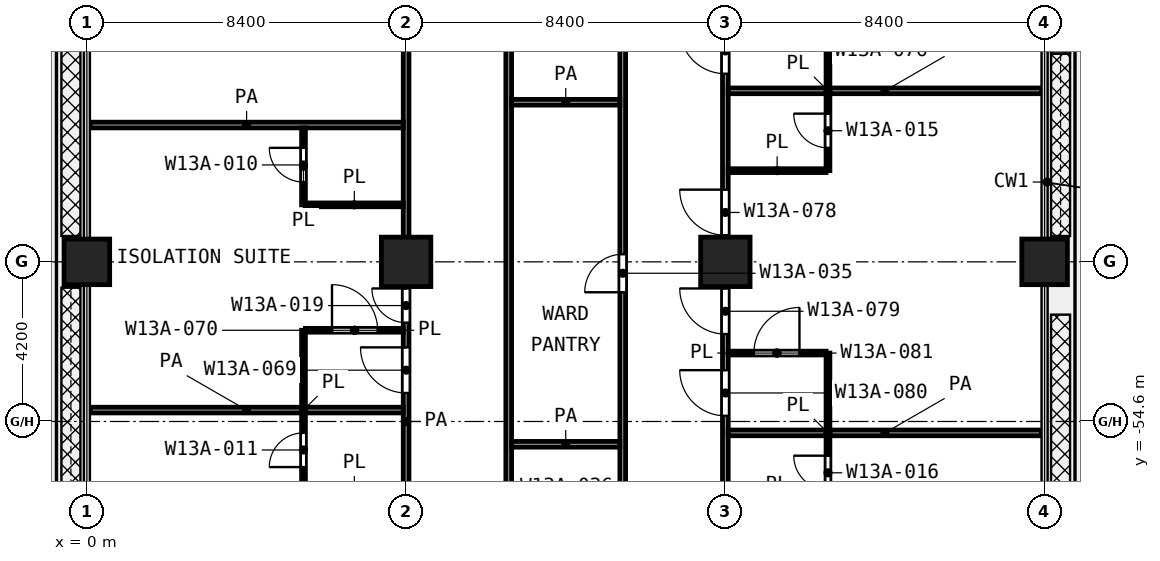
"""IFC4 building model, lengths in metres.
Left out: names, types, materials, properties, quantities, classifications, styles, units other than length and angle.
Written with IfcOpenShell. Run it as: python <this file> out.ifc"""

import sys

from ifc_helpers import new_model, si_unit, direction, frame, frame_2d, origin, origin_2d, place, context, subcontext, project, spatial, rectangle, extrude, element, fill, save


model = new_model("IFC4")
c1 = context("Model", 3, precision=1e-05, world=origin(), true_north=direction((0.0, 1.0)))
c2 = subcontext(c1, "Body", "Model", "MODEL_VIEW")
j1 = project(units=[si_unit("LENGTHUNIT", "METRE"), si_unit("PLANEANGLEUNIT", "RADIAN")], contexts=[c1])
p1 = place(None, origin())
s1 = spatial("IfcSite", under=j1, at=p1, CompositionType="ELEMENT")
p2 = place(p1, origin())
s2 = spatial("IfcBuilding", under=s1, at=p2, CompositionType="ELEMENT")
p3 = place(p2, frame((0.0, 0.0, 60.2)))
s3 = spatial("IfcBuildingStorey", under=s2, at=p3, CompositionType="ELEMENT", Elevation=60.2)
p4 = place(p3, frame((0.0, -50.4, 0.0), z_axis=(0.0, 0.0, 1.0), x_axis=(1.0, 0.0, 0.0)))
e1 = element("IfcColumn", 1, at=p4, inside=s3, PredefinedType="COLUMN", context=c2, shape_type="SweptSolid", body=[
    extrude(rectangle(XDim=1.2, YDim=1.2, at=origin_2d()), origin(), (0.0, 0.0, 1.0), 4.2),
])
for number, where, z_axis, x_axis in (
    (2, (8.4, -50.4, 0.0), (0.0, 0.0, 1.0), (1.0, 0.0, 0.0)),
    (3, (16.8, -50.4, 0.0), (0.0, 0.0, 1.0), (1.0, 0.0, 0.0)),
):
    element("IfcColumn", number, at=place(p3, frame(where, z_axis=z_axis, x_axis=x_axis)), inside=s3, PredefinedType="COLUMN", context=c2, shape_type="SweptSolid", body=[
        extrude(rectangle(XDim=1.3, YDim=1.3, at=origin_2d()), origin(), (0.0, 0.0, 1.0), 4.2),
    ])
p5 = place(p3, frame((25.2, -50.4, 0.0), z_axis=(0.0, 0.0, 1.0), x_axis=(1.0, 0.0, 0.0)))
e4 = element("IfcColumn", 4, at=p5, inside=s3, PredefinedType="COLUMN", context=c2, shape_type="SweptSolid", body=[
    extrude(rectangle(XDim=1.2, YDim=1.2, at=origin_2d()), origin(), (0.0, 0.0, 1.0), 4.2),
])
p6 = place(p3, frame((16.875, -52.8, 0.0), z_axis=(0.0, 0.0, 1.0), x_axis=(1.0, 0.0, 0.0)))
e5 = element("IfcWall", 5, at=p6, inside=s3, PredefinedType="PARTITIONING", context=c2, shape_type="SweptSolid", body=[
    extrude(rectangle(XDim=2.575, YDim=0.1, at=frame_2d((1.288, 0.0))), origin(), (0.0, 0.0, 1.0), 3.9),
])
p7 = place(p6, frame((0.675, 0.0, 0.0)))
e6 = element("IfcOpeningElement", 6, at=p7, cuts=e5, PredefinedType="OPENING", context=c2, shape_type="SweptSolid", body=[
    extrude(rectangle(XDim=1.2, YDim=2.1, at=frame_2d((0.6, 1.05))), frame((0.0, 0.06, 0.0), z_axis=(0.0, -1.0, 0.0), x_axis=(1.0, 0.0, 0.0)), (0.0, 0.0, 1.0), 0.12),
])
p8 = place(p3, frame((5.75, -52.2, 0.0), z_axis=(0.0, 0.0, 1.0), x_axis=(1.0, 0.0, 0.0)))
e7 = element("IfcWall", 7, at=p8, inside=s3, PredefinedType="PARTITIONING", context=c2, shape_type="SweptSolid", body=[
    extrude(rectangle(XDim=2.575, YDim=0.1, at=frame_2d((1.288, 0.0))), origin(), (0.0, 0.0, 1.0), 3.9),
])
p9 = place(p8, frame((0.7, 0.0, 0.0)))
e8 = element("IfcOpeningElement", 8, at=p9, cuts=e7, PredefinedType="OPENING", context=c2, shape_type="SweptSolid", body=[
    extrude(rectangle(XDim=1.2, YDim=2.1, at=frame_2d((0.6, 1.05))), frame((0.0, 0.06, 0.0), z_axis=(0.0, -1.0, 0.0), x_axis=(1.0, 0.0, 0.0)), (0.0, 0.0, 1.0), 0.12),
])
for number, where, z_axis, x_axis in (
    (9, (5.75, -48.9, 0.0), (0.0, 0.0, 1.0), (1.0, 0.0, 0.0)),
    (10, (16.875, -48.0, 0.0), (0.0, 0.0, 1.0), (1.0, 0.0, 0.0)),
):
    element("IfcWall", number, at=place(p3, frame(where, z_axis=z_axis, x_axis=x_axis)), inside=s3, PredefinedType="PARTITIONING", context=c2, shape_type="SweptSolid", body=[
        extrude(rectangle(XDim=2.575, YDim=0.1, at=frame_2d((1.288, 0.0))), origin(), (0.0, 0.0, 1.0), 3.9),
    ])
p10 = place(p3, frame((5.7, -56.4, 0.0), z_axis=(0.0, 0.0, 1.0), x_axis=(0.0, 1.0, 0.0)))
e11 = element("IfcWall", 11, at=p10, inside=s3, PredefinedType="PARTITIONING", context=c2, shape_type="SweptSolid", body=[
    extrude(rectangle(XDim=4.2, YDim=0.1, at=frame_2d((2.1, 0.0))), origin(), (0.0, 0.0, 1.0), 3.9),
])
p11 = place(p10, frame((0.6, 0.0, 0.0)))
e12 = element("IfcOpeningElement", 12, at=p11, cuts=e11, PredefinedType="OPENING", context=c2, shape_type="SweptSolid", body=[
    extrude(rectangle(XDim=0.9, YDim=2.1, at=frame_2d((0.45, 1.05))), frame((0.0, 0.06, 0.0), z_axis=(0.0, -1.0, 0.0), x_axis=(1.0, 0.0, 0.0)), (0.0, 0.0, 1.0), 0.12),
])
p12 = place(p3, frame((5.7, -48.9, 0.0), z_axis=(0.0, 0.0, 1.0), x_axis=(0.0, 1.0, 0.0)))
e13 = element("IfcWall", 13, at=p12, inside=s3, PredefinedType="PARTITIONING", context=c2, shape_type="SweptSolid", body=[
    extrude(rectangle(XDim=2.025, YDim=0.1, at=frame_2d((1.012, 0.0))), origin(), (0.0, 0.0, 1.0), 3.9),
])
p13 = place(p12, frame((0.6, 0.0, 0.0)))
e14 = element("IfcOpeningElement", 14, at=p13, cuts=e13, PredefinedType="OPENING", context=c2, shape_type="SweptSolid", body=[
    extrude(rectangle(XDim=0.9, YDim=2.1, at=frame_2d((0.45, 1.05))), frame((0.0, 0.06, 0.0), z_axis=(0.0, -1.0, 0.0), x_axis=(1.0, 0.0, 0.0)), (0.0, 0.0, 1.0), 0.12),
])
p14 = place(p3, frame((19.5, -57.0, 0.0), z_axis=(0.0, 0.0, 1.0), x_axis=(0.0, 1.0, 0.0)))
e15 = element("IfcWall", 15, at=p14, inside=s3, PredefinedType="PARTITIONING", context=c2, shape_type="SweptSolid", body=[
    extrude(rectangle(XDim=4.2, YDim=0.1, at=frame_2d((2.1, 0.0))), origin(), (0.0, 0.0, 1.0), 3.9),
])
p15 = place(p14, frame((0.6, 0.0, 0.0)))
e16 = element("IfcOpeningElement", 16, at=p15, cuts=e15, PredefinedType="OPENING", context=c2, shape_type="SweptSolid", body=[
    extrude(rectangle(XDim=0.9, YDim=2.1, at=frame_2d((0.45, 1.05))), frame((0.0, 0.06, 0.0), z_axis=(0.0, -1.0, 0.0), x_axis=(1.0, 0.0, 0.0)), (0.0, 0.0, 1.0), 0.12),
])
p16 = place(p3, frame((19.5, -48.0, 0.0), z_axis=(0.0, 0.0, 1.0), x_axis=(0.0, 1.0, 0.0)))
e17 = element("IfcWall", 17, at=p16, inside=s3, PredefinedType="PARTITIONING", context=c2, shape_type="SweptSolid", body=[
    extrude(rectangle(XDim=4.2, YDim=0.1, at=frame_2d((2.1, 0.0))), origin(), (0.0, 0.0, 1.0), 3.9),
])
p17 = place(p16, frame((0.6, 0.0, 0.0)))
e18 = element("IfcOpeningElement", 18, at=p17, cuts=e17, PredefinedType="OPENING", context=c2, shape_type="SweptSolid", body=[
    extrude(rectangle(XDim=0.9, YDim=2.1, at=frame_2d((0.45, 1.05))), frame((0.0, 0.06, 0.0), z_axis=(0.0, -1.0, 0.0), x_axis=(1.0, 0.0, 0.0)), (0.0, 0.0, 1.0), 0.12),
])
p18 = place(p3, frame((11.175, -55.2, 0.0), z_axis=(0.0, 0.0, 1.0), x_axis=(1.0, 0.0, 0.0)))
e19 = element("IfcWall", 19, at=p18, inside=s3, PredefinedType="PARTITIONING", context=c2, shape_type="SweptSolid", body=[
    extrude(rectangle(XDim=2.85, YDim=0.15, at=frame_2d((1.425, 0.0))), origin(), (0.0, 0.0, 1.0), 3.9),
])
p19 = place(p3, frame((16.875, -54.9, 0.0), z_axis=(0.0, 0.0, 1.0), x_axis=(1.0, 0.0, 0.0)))
e20 = element("IfcWall", 20, at=p19, inside=s3, PredefinedType="PARTITIONING", context=c2, shape_type="SweptSolid", body=[
    extrude(rectangle(XDim=8.245, YDim=0.15, at=frame_2d((4.123, 0.0))), origin(), (0.0, 0.0, 1.0), 3.9),
])
for number, where, z_axis, x_axis in (
    (21, (0.08, -54.3, 0.0), (0.0, 0.0, 1.0), (1.0, 0.0, 0.0)),
    (22, (0.08, -46.8, 0.0), (0.0, 0.0, 1.0), (1.0, 0.0, 0.0)),
):
    element("IfcWall", number, at=place(p3, frame(where, z_axis=z_axis, x_axis=x_axis)), inside=s3, PredefinedType="PARTITIONING", context=c2, shape_type="SweptSolid", body=[
        extrude(rectangle(XDim=8.245, YDim=0.15, at=frame_2d((4.123, 0.0))), origin(), (0.0, 0.0, 1.0), 3.9),
    ])
p20 = place(p3, frame((11.175, -46.2, 0.0), z_axis=(0.0, 0.0, 1.0), x_axis=(1.0, 0.0, 0.0)))
e23 = element("IfcWall", 23, at=p20, inside=s3, PredefinedType="PARTITIONING", context=c2, shape_type="SweptSolid", body=[
    extrude(rectangle(XDim=2.85, YDim=0.15, at=frame_2d((1.425, 0.0))), origin(), (0.0, 0.0, 1.0), 3.9),
])
p21 = place(p3, frame((16.875, -45.9, 0.0), z_axis=(0.0, 0.0, 1.0), x_axis=(1.0, 0.0, 0.0)))
e24 = element("IfcWall", 24, at=p21, inside=s3, PredefinedType="PARTITIONING", context=c2, shape_type="SweptSolid", body=[
    extrude(rectangle(XDim=8.245, YDim=0.15, at=frame_2d((4.123, 0.0))), origin(), (0.0, 0.0, 1.0), 3.9),
])
p22 = place(p3, frame((8.4, -66.55, 0.0), z_axis=(0.0, 0.0, 1.0), x_axis=(0.0, 1.0, 0.0)))
e25 = element("IfcWall", 25, at=p22, inside=s3, PredefinedType="PARTITIONING", context=c2, shape_type="SweptSolid", body=[
    extrude(rectangle(XDim=23.9, YDim=0.15, at=frame_2d((11.95, 0.0))), origin(), (0.0, 0.0, 1.0), 3.9),
])
p23 = place(p22, frame((14.55, 0.0, 0.0)))
e26 = element("IfcOpeningElement", 26, at=p23, cuts=e25, PredefinedType="OPENING", context=c2, shape_type="SweptSolid", body=[
    extrude(rectangle(XDim=0.9, YDim=2.1, at=frame_2d((0.45, 1.05))), frame((0.0, 0.085, 0.0), z_axis=(0.0, -1.0, 0.0), x_axis=(1.0, 0.0, 0.0)), (0.0, 0.0, 1.0), 0.17),
])
p24 = place(p22, frame((12.7, 0.0, 0.0)))
e27 = element("IfcOpeningElement", 27, at=p24, cuts=e25, PredefinedType="OPENING", context=c2, shape_type="SweptSolid", body=[
    extrude(rectangle(XDim=1.2, YDim=2.1, at=frame_2d((0.6, 1.05))), frame((0.0, 0.085, 0.0), z_axis=(0.0, -1.0, 0.0), x_axis=(1.0, 0.0, 0.0)), (0.0, 0.0, 1.0), 0.17),
])
p25 = place(p22, frame((5.85, 0.0, 0.0)))
e28 = element("IfcOpeningElement", 28, at=p25, cuts=e25, PredefinedType="OPENING", context=c2, shape_type="SweptSolid", body=[
    extrude(rectangle(XDim=1.2, YDim=2.1, at=frame_2d((0.6, 1.05))), frame((0.0, 0.085, 0.0), z_axis=(0.0, -1.0, 0.0), x_axis=(1.0, 0.0, 0.0)), (0.0, 0.0, 1.0), 0.17),
])
p26 = place(p22, frame((8.45, 0.0, 0.0)))
e29 = element("IfcOpeningElement", 29, at=p26, cuts=e25, PredefinedType="OPENING", context=c2, shape_type="SweptSolid", body=[
    extrude(rectangle(XDim=1.2, YDim=2.1, at=frame_2d((0.6, 1.05))), frame((0.0, 0.085, 0.0), z_axis=(0.0, -1.0, 0.0), x_axis=(1.0, 0.0, 0.0)), (0.0, 0.0, 1.0), 0.17),
])
p27 = place(p22, frame((3.7, 0.0, 0.0)))
e30 = element("IfcOpeningElement", 30, at=p27, cuts=e25, PredefinedType="OPENING", context=c2, shape_type="SweptSolid", body=[
    extrude(rectangle(XDim=1.2, YDim=2.1, at=frame_2d((0.6, 1.05))), frame((0.0, 0.085, 0.0), z_axis=(0.0, -1.0, 0.0), x_axis=(1.0, 0.0, 0.0)), (0.0, 0.0, 1.0), 0.17),
])
p28 = place(p22, frame((1.175, 0.0, 0.0)))
e31 = element("IfcOpeningElement", 31, at=p28, cuts=e25, PredefinedType="OPENING", context=c2, shape_type="SweptSolid", body=[
    extrude(rectangle(XDim=0.9, YDim=2.1, at=frame_2d((0.45, 1.05))), frame((0.0, 0.085, 0.0), z_axis=(0.0, -1.0, 0.0), x_axis=(1.0, 0.0, 0.0)), (0.0, 0.0, 1.0), 0.17),
])
p29 = place(p3, frame((11.1, -58.7, 0.0), z_axis=(0.0, 0.0, 1.0), x_axis=(0.0, 1.0, 0.0)))
e32 = element("IfcWall", 32, at=p29, inside=s3, PredefinedType="PARTITIONING", context=c2, shape_type="SweptSolid", body=[
    extrude(rectangle(XDim=29.3, YDim=0.15, at=frame_2d((14.65, 0.0))), origin(), (0.0, 0.0, 1.0), 3.9),
])
p30 = place(p29, frame((24.9, 0.0, 0.0)))
e33 = element("IfcOpeningElement", 33, at=p30, cuts=e32, PredefinedType="OPENING", context=c2, shape_type="SweptSolid", body=[
    extrude(rectangle(XDim=1.0, YDim=2.1, at=frame_2d((0.5, 1.05))), frame((0.0, 0.085, 0.0), z_axis=(0.0, -1.0, 0.0), x_axis=(1.0, 0.0, 0.0)), (0.0, 0.0, 1.0), 0.17),
])
p31 = place(p29, frame((18.6, 0.0, 0.0)))
e34 = element("IfcOpeningElement", 34, at=p31, cuts=e32, PredefinedType="OPENING", context=c2, shape_type="SweptSolid", body=[
    extrude(rectangle(XDim=1.0, YDim=2.1, at=frame_2d((0.5, 1.05))), frame((0.0, 0.085, 0.0), z_axis=(0.0, -1.0, 0.0), x_axis=(1.0, 0.0, 0.0)), (0.0, 0.0, 1.0), 0.17),
])
p32 = place(p29, frame((14.1, 0.0, 0.0)))
e35 = element("IfcOpeningElement", 35, at=p32, cuts=e32, PredefinedType="OPENING", context=c2, shape_type="SweptSolid", body=[
    extrude(rectangle(XDim=1.0, YDim=2.1, at=frame_2d((0.5, 1.05))), frame((0.0, 0.085, 0.0), z_axis=(0.0, -1.0, 0.0), x_axis=(1.0, 0.0, 0.0)), (0.0, 0.0, 1.0), 0.17),
])
p33 = place(p29, frame((1.2, 0.0, 0.0)))
e36 = element("IfcOpeningElement", 36, at=p33, cuts=e32, PredefinedType="OPENING", context=c2, shape_type="SweptSolid", body=[
    extrude(rectangle(XDim=1.0, YDim=2.1, at=frame_2d((0.5, 1.05))), frame((0.0, 0.085, 0.0), z_axis=(0.0, -1.0, 0.0), x_axis=(1.0, 0.0, 0.0)), (0.0, 0.0, 1.0), 0.17),
])
p34 = place(p3, frame((14.1, -58.7, 0.0), z_axis=(0.0, 0.0, 1.0), x_axis=(0.0, 1.0, 0.0)))
e37 = element("IfcWall", 37, at=p34, inside=s3, PredefinedType="PARTITIONING", context=c2, shape_type="SweptSolid", body=[
    extrude(rectangle(XDim=29.3, YDim=0.15, at=frame_2d((14.65, 0.0))), origin(), (0.0, 0.0, 1.0), 3.9),
])
p35 = place(p34, frame((7.5, 0.0, 0.0)))
e38 = element("IfcOpeningElement", 38, at=p35, cuts=e37, PredefinedType="OPENING", context=c2, shape_type="SweptSolid", body=[
    extrude(rectangle(XDim=1.0, YDim=2.1, at=frame_2d((0.5, 1.05))), frame((0.0, 0.085, 0.0), z_axis=(0.0, -1.0, 0.0), x_axis=(1.0, 0.0, 0.0)), (0.0, 0.0, 1.0), 0.17),
])
p36 = place(p3, frame((16.8, -58.798, 0.0), z_axis=(0.0, 0.0, 1.0), x_axis=(0.0, 1.0, 0.0)))
e39 = element("IfcWall", 39, at=p36, inside=s3, PredefinedType="PARTITIONING", context=c2, shape_type="SweptSolid", body=[
    extrude(rectangle(XDim=33.698, YDim=0.15, at=frame_2d((16.849, 0.0))), origin(), (0.0, 0.0, 1.0), 3.9),
])
p37 = place(p36, frame((23.298, 0.0, 0.0)))
e40 = element("IfcOpeningElement", 40, at=p37, cuts=e39, PredefinedType="OPENING", context=c2, shape_type="SweptSolid", body=[
    extrude(rectangle(XDim=1.2, YDim=2.1, at=frame_2d((0.6, 1.05))), frame((0.0, 0.085, 0.0), z_axis=(0.0, -1.0, 0.0), x_axis=(1.0, 0.0, 0.0)), (0.0, 0.0, 1.0), 0.17),
])
p38 = place(p36, frame((15.223, 0.0, 0.0)))
e41 = element("IfcOpeningElement", 41, at=p38, cuts=e39, PredefinedType="OPENING", context=c2, shape_type="SweptSolid", body=[
    extrude(rectangle(XDim=0.9, YDim=2.1, at=frame_2d((0.45, 1.05))), frame((0.0, 0.085, 0.0), z_axis=(0.0, -1.0, 0.0), x_axis=(1.0, 0.0, 0.0)), (0.0, 0.0, 1.0), 0.17),
])
p39 = place(p36, frame((13.348, 0.0, 0.0)))
e42 = element("IfcOpeningElement", 42, at=p39, cuts=e39, PredefinedType="OPENING", context=c2, shape_type="SweptSolid", body=[
    extrude(rectangle(XDim=1.2, YDim=2.1, at=frame_2d((0.6, 1.05))), frame((0.0, 0.085, 0.0), z_axis=(0.0, -1.0, 0.0), x_axis=(1.0, 0.0, 0.0)), (0.0, 0.0, 1.0), 0.17),
])
p40 = place(p36, frame((9.098, 0.0, 0.0)))
e43 = element("IfcOpeningElement", 43, at=p40, cuts=e39, PredefinedType="OPENING", context=c2, shape_type="SweptSolid", body=[
    extrude(rectangle(XDim=1.2, YDim=2.1, at=frame_2d((0.6, 1.05))), frame((0.0, 0.085, 0.0), z_axis=(0.0, -1.0, 0.0), x_axis=(1.0, 0.0, 0.0)), (0.0, 0.0, 1.0), 0.17),
])
p41 = place(p36, frame((6.498, 0.0, 0.0)))
e44 = element("IfcOpeningElement", 44, at=p41, cuts=e39, PredefinedType="OPENING", context=c2, shape_type="SweptSolid", body=[
    extrude(rectangle(XDim=1.2, YDim=2.1, at=frame_2d((0.6, 1.05))), frame((0.0, 0.085, 0.0), z_axis=(0.0, -1.0, 0.0), x_axis=(1.0, 0.0, 0.0)), (0.0, 0.0, 1.0), 0.17),
])
p42 = place(p36, frame((4.348, 0.0, 0.0)))
e45 = element("IfcOpeningElement", 45, at=p42, cuts=e39, PredefinedType="OPENING", context=c2, shape_type="SweptSolid", body=[
    extrude(rectangle(XDim=1.2, YDim=2.1, at=frame_2d((0.6, 1.05))), frame((0.0, 0.085, 0.0), z_axis=(0.0, -1.0, 0.0), x_axis=(1.0, 0.0, 0.0)), (0.0, 0.0, 1.0), 0.17),
])
p43 = place(p36, frame((0.698, 0.0, 0.0)))
e46 = element("IfcOpeningElement", 46, at=p43, cuts=e39, PredefinedType="OPENING", context=c2, shape_type="SweptSolid", body=[
    extrude(rectangle(XDim=0.9, YDim=2.1, at=frame_2d((0.45, 1.05))), frame((0.0, 0.085, 0.0), z_axis=(0.0, -1.0, 0.0), x_axis=(1.0, 0.0, 0.0)), (0.0, 0.0, 1.0), 0.17),
])
p44 = place(p23, origin())
e47 = element("IfcDoor", 47, at=p44, inside=s3, OperationType="SINGLE_SWING_RIGHT", PredefinedType="DOOR", context=c2, shape_type="SweptSolid", body=[
    extrude(rectangle(XDim=0.9, YDim=2.1, at=frame_2d((0.45, 1.05))), frame((0.0, 0.025, 0.0), z_axis=(0.0, -1.0, 0.0), x_axis=(1.0, 0.0, 0.0)), (0.0, 0.0, 1.0), 0.05),
])
fill(e26, e47)
p45 = place(p24, origin())
e48 = element("IfcDoor", 48, at=p45, inside=s3, OperationType="SINGLE_SWING_RIGHT", PredefinedType="DOOR", context=c2, shape_type="SweptSolid", body=[
    extrude(rectangle(XDim=1.2, YDim=2.1, at=frame_2d((0.6, 1.05))), frame((0.0, 0.025, 0.0), z_axis=(0.0, -1.0, 0.0), x_axis=(1.0, 0.0, 0.0)), (0.0, 0.0, 1.0), 0.05),
])
fill(e27, e48)
p46 = place(p9, origin())
e49 = element("IfcDoor", 49, at=p46, inside=s3, OperationType="SINGLE_SWING_LEFT", PredefinedType="DOOR", context=c2, shape_type="SweptSolid", body=[
    extrude(rectangle(XDim=1.2, YDim=2.1, at=frame_2d((0.6, 1.05))), frame((0.0, 0.025, 0.0), z_axis=(0.0, -1.0, 0.0), x_axis=(1.0, 0.0, 0.0)), (0.0, 0.0, 1.0), 0.05),
])
fill(e8, e49)
p47 = place(p13, origin())
e50 = element("IfcDoor", 50, at=p47, inside=s3, OperationType="SINGLE_SWING_RIGHT", PredefinedType="DOOR", context=c2, shape_type="SweptSolid", body=[
    extrude(rectangle(XDim=0.9, YDim=2.1, at=frame_2d((0.45, 1.05))), frame((0.0, 0.025, 0.0), z_axis=(0.0, -1.0, 0.0), x_axis=(1.0, 0.0, 0.0)), (0.0, 0.0, 1.0), 0.05),
])
fill(e14, e50)
p48 = place(p11, origin())
e51 = element("IfcDoor", 51, at=p48, inside=s3, OperationType="SINGLE_SWING_LEFT", PredefinedType="DOOR", context=c2, shape_type="SweptSolid", body=[
    extrude(rectangle(XDim=0.9, YDim=2.1, at=frame_2d((0.45, 1.05))), frame((0.0, 0.025, 0.0), z_axis=(0.0, -1.0, 0.0), x_axis=(1.0, 0.0, 0.0)), (0.0, 0.0, 1.0), 0.05),
])
fill(e12, e51)
p49 = place(p35, origin())
e52 = element("IfcDoor", 52, at=p49, inside=s3, OperationType="SINGLE_SWING_LEFT", PredefinedType="DOOR", context=c2, shape_type="SweptSolid", body=[
    extrude(rectangle(XDim=1.0, YDim=2.1, at=frame_2d((0.5, 1.05))), frame((0.0, 0.025, 0.0), z_axis=(0.0, -1.0, 0.0), x_axis=(1.0, 0.0, 0.0)), (0.0, 0.0, 1.0), 0.05),
])
fill(e38, e52)
p50 = place(p39, origin())
e53 = element("IfcDoor", 53, at=p50, inside=s3, OperationType="SINGLE_SWING_RIGHT", PredefinedType="DOOR", context=c2, shape_type="SweptSolid", body=[
    extrude(rectangle(XDim=1.2, YDim=2.1, at=frame_2d((0.6, 1.05))), frame((0.0, 0.025, 0.0), z_axis=(0.0, -1.0, 0.0), x_axis=(1.0, 0.0, 0.0)), (0.0, 0.0, 1.0), 0.05),
])
fill(e42, e53)
p51 = place(p40, origin())
e54 = element("IfcDoor", 54, at=p51, inside=s3, OperationType="SINGLE_SWING_RIGHT", PredefinedType="DOOR", context=c2, shape_type="SweptSolid", body=[
    extrude(rectangle(XDim=1.2, YDim=2.1, at=frame_2d((0.6, 1.05))), frame((0.0, 0.025, 0.0), z_axis=(0.0, -1.0, 0.0), x_axis=(1.0, 0.0, 0.0)), (0.0, 0.0, 1.0), 0.05),
])
fill(e43, e54)
p52 = place(p41, origin())
e55 = element("IfcDoor", 55, at=p52, inside=s3, OperationType="SINGLE_SWING_RIGHT", PredefinedType="DOOR", context=c2, shape_type="SweptSolid", body=[
    extrude(rectangle(XDim=1.2, YDim=2.1, at=frame_2d((0.6, 1.05))), frame((0.0, 0.025, 0.0), z_axis=(0.0, -1.0, 0.0), x_axis=(1.0, 0.0, 0.0)), (0.0, 0.0, 1.0), 0.05),
])
fill(e44, e55)
p53 = place(p42, origin())
e56 = element("IfcDoor", 56, at=p53, inside=s3, OperationType="SINGLE_SWING_RIGHT", PredefinedType="DOOR", context=c2, shape_type="SweptSolid", body=[
    extrude(rectangle(XDim=1.2, YDim=2.1, at=frame_2d((0.6, 1.05))), frame((0.0, 0.025, 0.0), z_axis=(0.0, -1.0, 0.0), x_axis=(1.0, 0.0, 0.0)), (0.0, 0.0, 1.0), 0.05),
])
fill(e45, e56)
p54 = place(p7, origin())
e57 = element("IfcDoor", 57, at=p54, inside=s3, OperationType="SINGLE_SWING_RIGHT", PredefinedType="DOOR", context=c2, shape_type="SweptSolid", body=[
    extrude(rectangle(XDim=1.2, YDim=2.1, at=frame_2d((0.6, 1.05))), frame((0.0, 0.025, 0.0), z_axis=(0.0, -1.0, 0.0), x_axis=(1.0, 0.0, 0.0)), (0.0, 0.0, 1.0), 0.05),
])
fill(e6, e57)
p55 = place(p17, origin())
e58 = element("IfcDoor", 58, at=p55, inside=s3, OperationType="SINGLE_SWING_RIGHT", PredefinedType="DOOR", context=c2, shape_type="SweptSolid", body=[
    extrude(rectangle(XDim=0.9, YDim=2.1, at=frame_2d((0.45, 1.05))), frame((0.0, 0.025, 0.0), z_axis=(0.0, -1.0, 0.0), x_axis=(1.0, 0.0, 0.0)), (0.0, 0.0, 1.0), 0.05),
])
fill(e18, e58)
p56 = place(p15, origin())
e59 = element("IfcDoor", 59, at=p56, inside=s3, OperationType="SINGLE_SWING_RIGHT", PredefinedType="DOOR", context=c2, shape_type="SweptSolid", body=[
    extrude(rectangle(XDim=0.9, YDim=2.1, at=frame_2d((0.45, 1.05))), frame((0.0, 0.025, 0.0), z_axis=(0.0, -1.0, 0.0), x_axis=(1.0, 0.0, 0.0)), (0.0, 0.0, 1.0), 0.05),
])
fill(e16, e59)
save(model, sys.argv[1])
